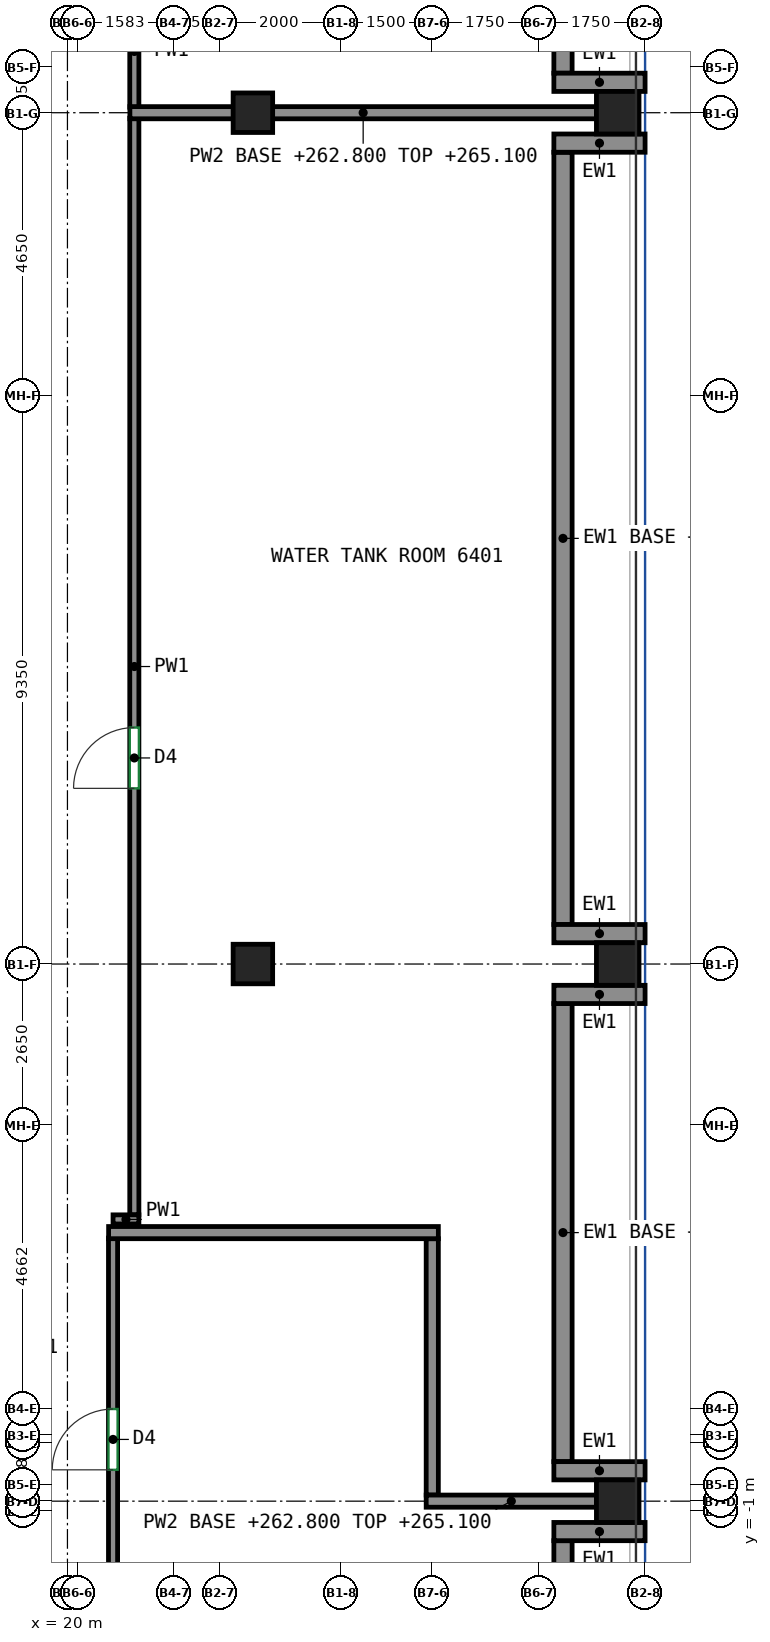
"""IFC4 building model, lengths in metres.
Left out: names, types, materials, properties, quantities, classifications, styles, units other than length and angle.
Written with IfcOpenShell. Run it as: python <this file> out.ifc"""

import sys

from ifc_helpers import new_model, si_unit, direction, frame, frame_2d, origin, origin_2d, place, context, subcontext, project, spatial, rectangle, extrude, source, transform, mapped, element, fill, save


model = new_model("IFC4")
c1 = context("Model", 3, precision=1e-05, world=origin(), true_north=direction((0.0, 1.0)))
c2 = subcontext(c1, "Body", "Model", "MODEL_VIEW")
j1 = project(units=[si_unit("LENGTHUNIT", "METRE"), si_unit("PLANEANGLEUNIT", "RADIAN")], contexts=[c1])
p1 = place(None, origin())
s1 = spatial("IfcSite", under=j1, at=p1, CompositionType="ELEMENT")
p2 = place(p1, origin())
s2 = spatial("IfcBuilding", under=s1, at=p2, CompositionType="ELEMENT")
p3 = place(p2, frame((0.0, 0.0, 262.8)))
s3 = spatial("IfcBuildingStorey", under=s2, at=p3, CompositionType="ELEMENT", Elevation=262.8)
m1 = source(origin(), c2, "Body", "SweptSolid", [
    extrude(rectangle(XDim=0.7, YDim=0.7, at=origin_2d()), origin(), (0.0, 0.0, 1.0), 2.3),
])
for number, where, z_axis, x_axis in (
    (1, (29.05, -0.833, 0.0), (0.0, 0.0, 1.0), (1.0, 0.0, 0.0)),
    (2, (29.05, 8.0, 0.0), (0.0, 0.0, 1.0), (1.0, 0.0, 0.0)),
    (3, (29.05, 22.0, 0.0), (0.0, 0.0, 1.0), (1.0, 0.0, 0.0)),
):
    element("IfcColumn", number, at=place(p3, frame(where, z_axis=z_axis, x_axis=x_axis)), inside=s3, PredefinedType="COLUMN", context=c2, shape_type="MappedRepresentation", body=[
        mapped(m1, transform((0.0, 0.0, 0.0))),
    ])
m2 = source(origin(), c2, "Body", "SweptSolid", [
    extrude(rectangle(XDim=0.65, YDim=0.65, at=origin_2d()), origin(), (0.0, 0.0, 1.0), 3.8),
])
for number, where, z_axis, x_axis in (
    (4, (23.05, 8.0, 0.0), (0.0, 0.0, 1.0), (1.0, 0.0, 0.0)),
    (5, (23.05, 22.0, 0.0), (0.0, 0.0, 1.0), (1.0, 0.0, 0.0)),
):
    element("IfcColumn", number, at=place(p3, frame(where, z_axis=z_axis, x_axis=x_axis)), inside=s3, PredefinedType="COLUMN", context=c2, shape_type="MappedRepresentation", body=[
        mapped(m2, transform((0.0, 0.0, 0.0))),
    ])
m3 = source(origin(), c2, "Body", "SweptSolid", [
    extrude(rectangle(XDim=7.533, YDim=0.3, at=frame_2d((3.767, 0.0))), origin(), (0.0, 0.0, 1.0), 1.1),
])
p4 = place(p3, frame((28.15, -9.017, 0.0), z_axis=(0.0, 0.0, 1.0), x_axis=(0.0, 1.0, 0.0)))
e6 = element("IfcWall", 6, at=p4, inside=s3, PredefinedType="SOLIDWALL", context=c2, shape_type="MappedRepresentation", body=[
    mapped(m3, transform((0.0, 0.0, 0.0))),
])
m4 = source(origin(), c2, "Body", "SweptSolid", [
    extrude(rectangle(XDim=1.5, YDim=0.3, at=frame_2d((0.75, 0.0))), origin(), (0.0, 0.0, 1.0), 2.3),
])
p5 = place(p3, frame((29.5, -1.333, 0.0), z_axis=(0.0, 0.0, 1.0), x_axis=(-1.0, 0.0, 0.0)))
e7 = element("IfcWall", 7, at=p5, inside=s3, PredefinedType="SOLIDWALL", context=c2, shape_type="MappedRepresentation", body=[
    mapped(m4, transform((0.0, 0.0, 0.0))),
])
m5 = source(origin(), c2, "Body", "SweptSolid", [
    extrude(rectangle(XDim=7.533, YDim=0.3, at=frame_2d((3.767, 0.0))), origin(), (0.0, 0.0, 1.0), 1.1),
])
p6 = place(p3, frame((28.15, -0.183, 0.0), z_axis=(0.0, 0.0, 1.0), x_axis=(0.0, 1.0, 0.0)))
e8 = element("IfcWall", 8, at=p6, inside=s3, PredefinedType="SOLIDWALL", context=c2, shape_type="MappedRepresentation", body=[
    mapped(m5, transform((0.0, 0.0, 0.0))),
])
for number, where, z_axis, x_axis in (
    (9, (29.5, -0.333, 0.0), (0.0, 0.0, 1.0), (-1.0, 0.0, 0.0)),
    (10, (29.5, 7.5, 0.0), (0.0, 0.0, 1.0), (-1.0, 0.0, 0.0)),
):
    element("IfcWall", number, at=place(p3, frame(where, z_axis=z_axis, x_axis=x_axis)), inside=s3, PredefinedType="SOLIDWALL", context=c2, shape_type="MappedRepresentation", body=[
        mapped(m4, transform((0.0, 0.0, 0.0))),
    ])
m6 = source(origin(), c2, "Body", "SweptSolid", [
    extrude(rectangle(XDim=12.7, YDim=0.3, at=frame_2d((6.35, 0.0))), origin(), (0.0, 0.0, 1.0), 1.1),
])
p7 = place(p3, frame((28.15, 8.65, 0.0), z_axis=(0.0, 0.0, 1.0), x_axis=(0.0, 1.0, 0.0)))
e11 = element("IfcWall", 11, at=p7, inside=s3, PredefinedType="SOLIDWALL", context=c2, shape_type="MappedRepresentation", body=[
    mapped(m6, transform((0.0, 0.0, 0.0))),
])
for number, where, z_axis, x_axis in (
    (12, (29.5, 8.5, 0.0), (0.0, 0.0, 1.0), (-1.0, 0.0, 0.0)),
    (13, (29.5, 21.5, 0.0), (0.0, 0.0, 1.0), (-1.0, 0.0, 0.0)),
):
    element("IfcWall", number, at=place(p3, frame(where, z_axis=z_axis, x_axis=x_axis)), inside=s3, PredefinedType="SOLIDWALL", context=c2, shape_type="MappedRepresentation", body=[
        mapped(m4, transform((0.0, 0.0, 0.0))),
    ])
m7 = source(origin(), c2, "Body", "SweptSolid", [
    extrude(rectangle(XDim=3.7, YDim=0.3, at=frame_2d((1.85, 0.0))), origin(), (0.0, 0.0, 1.0), 1.1),
])
p8 = place(p3, frame((28.15, 22.65, 0.0), z_axis=(0.0, 0.0, 1.0), x_axis=(0.0, 1.0, 0.0)))
e14 = element("IfcWall", 14, at=p8, inside=s3, PredefinedType="SOLIDWALL", context=c2, shape_type="MappedRepresentation", body=[
    mapped(m7, transform((0.0, 0.0, 0.0))),
])
p9 = place(p3, frame((29.5, 22.5, 0.0), z_axis=(0.0, 0.0, 1.0), x_axis=(-1.0, 0.0, 0.0)))
e15 = element("IfcWall", 15, at=p9, inside=s3, PredefinedType="SOLIDWALL", context=c2, shape_type="MappedRepresentation", body=[
    mapped(m4, transform((0.0, 0.0, 0.0))),
])
p10 = place(p3, frame((20.75, -7.75, 0.0), z_axis=(0.0, 0.0, 1.0), x_axis=(0.0, 1.0, 0.0)))
e16 = element("IfcWall", 16, at=p10, inside=s3, PredefinedType="PARTITIONING", context=c2, shape_type="SweptSolid", body=[
    extrude(rectangle(XDim=11.243, YDim=0.15, at=frame_2d((5.622, 0.0))), origin(), (0.0, 0.0, 1.0), 3.8),
])
p11 = place(p10, frame((7.432, 0.0, 0.0)))
e17 = element("IfcOpeningElement", 17, at=p11, cuts=e16, PredefinedType="OPENING", context=c2, shape_type="SweptSolid", body=[
    extrude(rectangle(XDim=1.0, YDim=2.1, at=frame_2d((0.5, 1.05))), frame((0.0, 0.085, 0.0), z_axis=(0.0, -1.0, 0.0), x_axis=(1.0, 0.0, 0.0)), (0.0, 0.0, 1.0), 0.17),
])
p12 = place(p3, frame((21.1, 3.875, 0.0), z_axis=(0.0, 0.0, 1.0), x_axis=(0.0, 1.0, 0.0)))
e18 = element("IfcWall", 18, at=p12, inside=s3, PredefinedType="PARTITIONING", context=c2, shape_type="SweptSolid", body=[
    extrude(rectangle(XDim=18.035, YDim=0.15, at=frame_2d((9.018, 0.0))), origin(), (0.0, 0.0, 1.0), 3.8),
])
p13 = place(p12, frame((7.014, 0.0, 0.0)))
e19 = element("IfcOpeningElement", 19, at=p13, cuts=e18, PredefinedType="OPENING", context=c2, shape_type="SweptSolid", body=[
    extrude(rectangle(XDim=1.0, YDim=2.1, at=frame_2d((0.5, 1.05))), frame((0.0, 0.085, 0.0), z_axis=(0.0, -1.0, 0.0), x_axis=(1.0, 0.0, 0.0)), (0.0, 0.0, 1.0), 0.17),
])
p14 = place(p3, frame((20.75, 3.8, 0.0), z_axis=(0.0, 0.0, 1.0), x_axis=(1.0, 0.0, 0.0)))
e20 = element("IfcWall", 20, at=p14, inside=s3, PredefinedType="PARTITIONING", context=c2, shape_type="SweptSolid", body=[
    extrude(rectangle(XDim=0.425, YDim=0.15, at=frame_2d((0.212, 0.0))), origin(), (0.0, 0.0, 1.0), 3.8),
])
p15 = place(p3, frame((21.1, 22.09, 0.0), z_axis=(0.0, 0.0, 1.0), x_axis=(0.0, 1.0, 0.0)))
e21 = element("IfcWall", 21, at=p15, inside=s3, PredefinedType="PARTITIONING", context=c2, shape_type="SweptSolid", body=[
    extrude(rectangle(XDim=1.835, YDim=0.15, at=frame_2d((0.917, 0.0))), origin(), (0.0, 0.0, 1.0), 3.8),
])
p16 = place(p3, frame((26.0, -0.733, 0.0), z_axis=(0.0, 0.0, 1.0), x_axis=(0.0, 1.0, 0.0)))
e22 = element("IfcWall", 22, at=p16, inside=s3, PredefinedType="PARTITIONING", context=c2, shape_type="SweptSolid", body=[
    extrude(rectangle(XDim=4.216, YDim=0.2, at=frame_2d((2.108, 0.0))), origin(), (0.0, 0.0, 1.0), 3.8),
])
p17 = place(p3, frame((28.7, -0.833, 0.0), z_axis=(0.0, 0.0, 1.0), x_axis=(-1.0, 0.0, 0.0)))
e23 = element("IfcWall", 23, at=p17, inside=s3, PredefinedType="PARTITIONING", context=c2, shape_type="SweptSolid", body=[
    extrude(rectangle(XDim=2.8, YDim=0.2, at=frame_2d((1.4, 0.0))), origin(), (0.0, 0.0, 1.0), 2.3),
])
p18 = place(p3, frame((26.1, 3.583, 0.0), z_axis=(0.0, 0.0, 1.0), x_axis=(-1.0, 0.0, 0.0)))
e24 = element("IfcWall", 24, at=p18, inside=s3, PredefinedType="PARTITIONING", context=c2, shape_type="SweptSolid", body=[
    extrude(rectangle(XDim=5.423, YDim=0.2, at=frame_2d((2.711, 0.0))), origin(), (0.0, 0.0, 1.0), 3.8),
])
p19 = place(p3, frame((21.027, 22.0, 0.0), z_axis=(0.0, 0.0, 1.0), x_axis=(1.0, 0.0, 0.0)))
e25 = element("IfcWall", 25, at=p19, inside=s3, PredefinedType="PARTITIONING", context=c2, shape_type="SweptSolid", body=[
    extrude(rectangle(XDim=7.673, YDim=0.2, at=frame_2d((3.836, 0.0))), origin(), (0.0, 0.0, 1.0), 2.3),
])
p20 = place(p11, origin())
e26 = element("IfcDoor", 26, at=p20, inside=s3, OperationType="SINGLE_SWING_LEFT", PredefinedType="DOOR", context=c2, shape_type="SweptSolid", body=[
    extrude(rectangle(XDim=1.0, YDim=2.1, at=frame_2d((0.5, 1.05))), frame((0.0, 0.025, 0.0), z_axis=(0.0, -1.0, 0.0), x_axis=(1.0, 0.0, 0.0)), (0.0, 0.0, 1.0), 0.05),
])
fill(e17, e26)
p21 = place(p13, origin())
e27 = element("IfcDoor", 27, at=p21, inside=s3, OperationType="SINGLE_SWING_LEFT", PredefinedType="DOOR", context=c2, shape_type="SweptSolid", body=[
    extrude(rectangle(XDim=1.0, YDim=2.1, at=frame_2d((0.5, 1.05))), frame((0.0, 0.025, 0.0), z_axis=(0.0, -1.0, 0.0), x_axis=(1.0, 0.0, 0.0)), (0.0, 0.0, 1.0), 0.05),
])
fill(e19, e27)
save(model, sys.argv[1])
